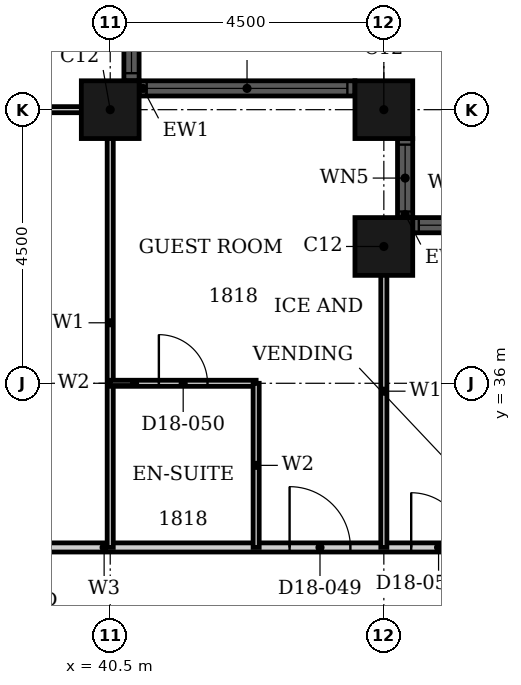
"""IFC4 building model, lengths in metres.
Left out: names, types, materials, properties, quantities, classifications, styles, units other than length and angle.
Written with IfcOpenShell. Run it as: python <this file> out.ifc"""

import sys

from ifc_helpers import new_model, si_unit, direction, frame, frame_2d, origin, origin_2d, place, context, subcontext, project, spatial, rectangle, hollow_rectangle, extrude, element, fill, save


model = new_model("IFC4")
c1 = context("Model", 3, precision=1e-05, world=origin(), true_north=direction((0.0, 1.0)))
c2 = subcontext(c1, "Body", "Model", "MODEL_VIEW")
j1 = project(units=[si_unit("LENGTHUNIT", "METRE"), si_unit("PLANEANGLEUNIT", "RADIAN")], contexts=[c1])
p1 = place(None, origin())
s1 = spatial("IfcSite", under=j1, at=p1, CompositionType="ELEMENT")
p2 = place(p1, origin())
s2 = spatial("IfcBuilding", under=s1, at=p2, CompositionType="ELEMENT")
p3 = place(p2, frame((0.0, 0.0, 78.0)))
s3 = spatial("IfcBuildingStorey", under=s2, at=p3, CompositionType="ELEMENT", Elevation=78.0)
for number, where, z_axis, x_axis in (
    (1, (45.0, 38.25, 0.0), (0.0, 0.0, 1.0), (1.0, 0.0, 0.0)),
    (2, (45.0, 40.5, 0.0), (0.0, 0.0, 1.0), (1.0, 0.0, 0.0)),
    (3, (40.5, 40.5, 0.0), (0.0, 0.0, 1.0), (1.0, 0.0, 0.0)),
):
    element("IfcColumn", number, at=place(p3, frame(where, z_axis=z_axis, x_axis=x_axis)), inside=s3, PredefinedType="COLUMN", context=c2, shape_type="SweptSolid", body=[
        extrude(hollow_rectangle(XDim=0.95, YDim=0.95, WallThickness=0.03, at=origin_2d()), origin(), (0.0, 0.0, 1.0), 3.6),
    ])
p4 = place(p3, frame((46.775, 38.6, 0.0), z_axis=(0.0, 0.0, 1.0), x_axis=(-1.0, 0.0, 0.0)))
e4 = element("IfcWall", 4, at=p4, inside=s3, PredefinedType="SOLIDWALL", context=c2, shape_type="SweptSolid", body=[
    extrude(rectangle(XDim=1.3, YDim=0.25, at=frame_2d((0.65, 0.0))), origin(), (0.0, 0.0, 1.0), 3.6),
])
p5 = place(p4, frame((0.1, 0.0, 0.9)))
e5 = element("IfcOpeningElement", 5, at=p5, cuts=e4, PredefinedType="OPENING", context=c2, shape_type="SweptSolid", body=[
    extrude(rectangle(XDim=1.1, YDim=2.08, at=frame_2d((0.55, 1.04))), frame((0.0, 0.135, 0.0), z_axis=(0.0, -1.0, 0.0), x_axis=(1.0, 0.0, 0.0)), (0.0, 0.0, 1.0), 0.27),
])
p6 = place(p3, frame((45.35, 38.725, 0.0), z_axis=(0.0, 0.0, 1.0), x_axis=(0.0, 1.0, 0.0)))
e6 = element("IfcWall", 6, at=p6, inside=s3, PredefinedType="SOLIDWALL", context=c2, shape_type="SweptSolid", body=[
    extrude(rectangle(XDim=1.3, YDim=0.25, at=frame_2d((0.65, 0.0))), origin(), (0.0, 0.0, 1.0), 3.6),
])
p7 = place(p6, frame((0.1, 0.0, 0.9)))
e7 = element("IfcOpeningElement", 7, at=p7, cuts=e6, PredefinedType="OPENING", context=c2, shape_type="SweptSolid", body=[
    extrude(rectangle(XDim=1.1, YDim=2.08, at=frame_2d((0.55, 1.04))), frame((0.0, 0.135, 0.0), z_axis=(0.0, -1.0, 0.0), x_axis=(1.0, 0.0, 0.0)), (0.0, 0.0, 1.0), 0.27),
])
p8 = place(p3, frame((44.525, 40.85, 0.0), z_axis=(0.0, 0.0, 1.0), x_axis=(-1.0, 0.0, 0.0)))
e8 = element("IfcWall", 8, at=p8, inside=s3, PredefinedType="SOLIDWALL", context=c2, shape_type="SweptSolid", body=[
    extrude(rectangle(XDim=3.55, YDim=0.25, at=frame_2d((1.775, 0.0))), origin(), (0.0, 0.0, 1.0), 3.6),
])
p9 = place(p8, frame((0.125, 0.0, 0.9)))
e9 = element("IfcOpeningElement", 9, at=p9, cuts=e8, PredefinedType="OPENING", context=c2, shape_type="SweptSolid", body=[
    extrude(rectangle(XDim=3.3, YDim=2.08, at=frame_2d((1.65, 1.04))), frame((0.0, 0.135, 0.0), z_axis=(0.0, -1.0, 0.0), x_axis=(1.0, 0.0, 0.0)), (0.0, 0.0, 1.0), 0.27),
])
p10 = place(p3, frame((40.85, 40.975, 0.0), z_axis=(0.0, 0.0, 1.0), x_axis=(0.0, 1.0, 0.0)))
e10 = element("IfcWall", 10, at=p10, inside=s3, PredefinedType="SOLIDWALL", context=c2, shape_type="SweptSolid", body=[
    extrude(rectangle(XDim=8.05, YDim=0.25, at=frame_2d((4.025, 0.0))), origin(), (0.0, 0.0, 1.0), 3.6),
])
p11 = place(p10, frame((0.125, 0.0, 0.9)))
e11 = element("IfcOpeningElement", 11, at=p11, cuts=e10, PredefinedType="OPENING", context=c2, shape_type="SweptSolid", body=[
    extrude(rectangle(XDim=3.3, YDim=2.08, at=frame_2d((1.65, 1.04))), frame((0.0, 0.135, 0.0), z_axis=(0.0, -1.0, 0.0), x_axis=(1.0, 0.0, 0.0)), (0.0, 0.0, 1.0), 0.27),
])
p12 = place(p10, frame((4.625, 0.0, 0.9)))
e12 = element("IfcOpeningElement", 12, at=p12, cuts=e10, PredefinedType="OPENING", context=c2, shape_type="SweptSolid", body=[
    extrude(rectangle(XDim=3.3, YDim=2.08, at=frame_2d((1.65, 1.04))), frame((0.0, 0.135, 0.0), z_axis=(0.0, -1.0, 0.0), x_axis=(1.0, 0.0, 0.0)), (0.0, 0.0, 1.0), 0.27),
])
p13 = place(p3, frame((33.3, 33.3, 0.0), z_axis=(0.0, 0.0, 1.0), x_axis=(1.0, 0.0, 0.0)))
e13 = element("IfcWall", 13, at=p13, inside=s3, PredefinedType="PARTITIONING", context=c2, shape_type="SweptSolid", body=[
    extrude(rectangle(XDim=13.5, YDim=0.15, at=frame_2d((6.75, 0.0))), origin(), (0.0, 0.0, 1.0), 3.3),
])
p14 = place(p13, frame((10.15, 0.0, 0.0)))
e14 = element("IfcOpeningElement", 14, at=p14, cuts=e13, PredefinedType="OPENING", context=c2, shape_type="SweptSolid", body=[
    extrude(rectangle(XDim=1.0, YDim=2.1, at=frame_2d((0.5, 1.05))), frame((0.0, 0.085, 0.0), z_axis=(0.0, -1.0, 0.0), x_axis=(1.0, 0.0, 0.0)), (0.0, 0.0, 1.0), 0.17),
])
p15 = place(p13, frame((12.15, 0.0, 0.0)))
e15 = element("IfcOpeningElement", 15, at=p15, cuts=e13, PredefinedType="OPENING", context=c2, shape_type="SweptSolid", body=[
    extrude(rectangle(XDim=0.9, YDim=2.1, at=frame_2d((0.45, 1.05))), frame((0.0, 0.085, 0.0), z_axis=(0.0, -1.0, 0.0), x_axis=(1.0, 0.0, 0.0)), (0.0, 0.0, 1.0), 0.17),
])
p16 = place(p13, frame((3.15, 0.0, 0.0)))
e16 = element("IfcOpeningElement", 16, at=p16, cuts=e13, PredefinedType="OPENING", context=c2, shape_type="SweptSolid", body=[
    extrude(rectangle(XDim=0.9, YDim=2.1, at=frame_2d((0.45, 1.05))), frame((0.0, 0.085, 0.0), z_axis=(0.0, -1.0, 0.0), x_axis=(1.0, 0.0, 0.0)), (0.0, 0.0, 1.0), 0.17),
])
p17 = place(p3, frame((33.3, 40.5, 0.0), z_axis=(0.0, 0.0, 1.0), x_axis=(1.0, 0.0, 0.0)))
e17 = element("IfcWall", 17, at=p17, inside=s3, PredefinedType="PARTITIONING", context=c2, shape_type="SweptSolid", body=[
    extrude(rectangle(XDim=7.39, YDim=0.1, at=frame_2d((3.695, 0.0))), origin(), (0.0, 0.0, 1.0), 2.38),
])
p18 = place(p3, frame((40.5, 33.3, 0.0), z_axis=(0.0, 0.0, 1.0), x_axis=(0.0, 1.0, 0.0)))
e18 = element("IfcWall", 18, at=p18, inside=s3, PredefinedType="PARTITIONING", context=c2, shape_type="SweptSolid", body=[
    extrude(rectangle(XDim=7.39, YDim=0.1, at=frame_2d((3.695, 0.0))), origin(), (0.0, 0.0, 1.0), 3.3),
])
p19 = place(p3, frame((45.0, 33.3, 0.0), z_axis=(0.0, 0.0, 1.0), x_axis=(0.0, 1.0, 0.0)))
e19 = element("IfcWall", 19, at=p19, inside=s3, PredefinedType="PARTITIONING", context=c2, shape_type="SweptSolid", body=[
    extrude(rectangle(XDim=5.14, YDim=0.1, at=frame_2d((2.57, 0.0))), origin(), (0.0, 0.0, 1.0), 3.3),
])
p20 = place(p3, frame((40.5, 36.0, 0.0), z_axis=(0.0, 0.0, 1.0), x_axis=(1.0, 0.0, 0.0)))
e20 = element("IfcWall", 20, at=p20, inside=s3, PredefinedType="PARTITIONING", context=c2, shape_type="SweptSolid", body=[
    extrude(rectangle(XDim=2.4, YDim=0.1, at=frame_2d((1.2, 0.0))), origin(), (0.0, 0.0, 1.0), 3.3),
])
p21 = place(p20, frame((0.8, 0.0, 0.0)))
e21 = element("IfcOpeningElement", 21, at=p21, cuts=e20, PredefinedType="OPENING", context=c2, shape_type="SweptSolid", body=[
    extrude(rectangle(XDim=0.8, YDim=2.1, at=frame_2d((0.4, 1.05))), frame((0.0, 0.06, 0.0), z_axis=(0.0, -1.0, 0.0), x_axis=(1.0, 0.0, 0.0)), (0.0, 0.0, 1.0), 0.12),
])
p22 = place(p3, frame((42.9, 33.3, 0.0), z_axis=(0.0, 0.0, 1.0), x_axis=(0.0, 1.0, 0.0)))
e22 = element("IfcWall", 22, at=p22, inside=s3, PredefinedType="PARTITIONING", context=c2, shape_type="SweptSolid", body=[
    extrude(rectangle(XDim=2.7, YDim=0.1, at=frame_2d((1.35, 0.0))), origin(), (0.0, 0.0, 1.0), 3.3),
])
p23 = place(p5, origin())
e23 = element("IfcWindow", 23, at=p23, inside=s3, PartitioningType="SINGLE_PANEL", PredefinedType="WINDOW", context=c2, shape_type="SweptSolid", body=[
    extrude(rectangle(XDim=1.1, YDim=2.08, at=frame_2d((0.55, 1.04))), frame((0.0, 0.03, 0.0), z_axis=(0.0, -1.0, 0.0), x_axis=(1.0, 0.0, 0.0)), (0.0, 0.0, 1.0), 0.06),
])
fill(e5, e23)
p24 = place(p7, origin())
e24 = element("IfcWindow", 24, at=p24, inside=s3, PartitioningType="SINGLE_PANEL", PredefinedType="WINDOW", context=c2, shape_type="SweptSolid", body=[
    extrude(rectangle(XDim=1.1, YDim=2.08, at=frame_2d((0.55, 1.04))), frame((0.0, 0.03, 0.0), z_axis=(0.0, -1.0, 0.0), x_axis=(1.0, 0.0, 0.0)), (0.0, 0.0, 1.0), 0.06),
])
fill(e7, e24)
p25 = place(p9, origin())
e25 = element("IfcWindow", 25, at=p25, inside=s3, PartitioningType="SINGLE_PANEL", PredefinedType="WINDOW", context=c2, shape_type="SweptSolid", body=[
    extrude(rectangle(XDim=3.3, YDim=2.08, at=frame_2d((1.65, 1.04))), frame((0.0, 0.03, 0.0), z_axis=(0.0, -1.0, 0.0), x_axis=(1.0, 0.0, 0.0)), (0.0, 0.0, 1.0), 0.06),
])
fill(e9, e25)
p26 = place(p11, origin())
e26 = element("IfcWindow", 26, at=p26, inside=s3, PartitioningType="SINGLE_PANEL", PredefinedType="WINDOW", context=c2, shape_type="SweptSolid", body=[
    extrude(rectangle(XDim=3.3, YDim=2.08, at=frame_2d((1.65, 1.04))), frame((0.0, 0.03, 0.0), z_axis=(0.0, -1.0, 0.0), x_axis=(1.0, 0.0, 0.0)), (0.0, 0.0, 1.0), 0.06),
])
fill(e11, e26)
p27 = place(p14, origin())
e27 = element("IfcDoor", 27, at=p27, inside=s3, OperationType="SINGLE_SWING_RIGHT", PredefinedType="DOOR", context=c2, shape_type="SweptSolid", body=[
    extrude(rectangle(XDim=1.0, YDim=2.1, at=frame_2d((0.5, 1.05))), frame((0.0, 0.025, 0.0), z_axis=(0.0, -1.0, 0.0), x_axis=(1.0, 0.0, 0.0)), (0.0, 0.0, 1.0), 0.05),
])
fill(e14, e27)
p28 = place(p21, origin())
e28 = element("IfcDoor", 28, at=p28, inside=s3, OperationType="SINGLE_SWING_LEFT", PredefinedType="DOOR", context=c2, shape_type="SweptSolid", body=[
    extrude(rectangle(XDim=0.8, YDim=2.1, at=frame_2d((0.4, 1.05))), frame((0.0, 0.025, 0.0), z_axis=(0.0, -1.0, 0.0), x_axis=(1.0, 0.0, 0.0)), (0.0, 0.0, 1.0), 0.05),
])
fill(e21, e28)
p29 = place(p15, origin())
e29 = element("IfcDoor", 29, at=p29, inside=s3, OperationType="SINGLE_SWING_LEFT", PredefinedType="DOOR", context=c2, shape_type="SweptSolid", body=[
    extrude(rectangle(XDim=0.9, YDim=2.1, at=frame_2d((0.45, 1.05))), frame((0.0, 0.025, 0.0), z_axis=(0.0, -1.0, 0.0), x_axis=(1.0, 0.0, 0.0)), (0.0, 0.0, 1.0), 0.05),
])
fill(e15, e29)
save(model, sys.argv[1])
